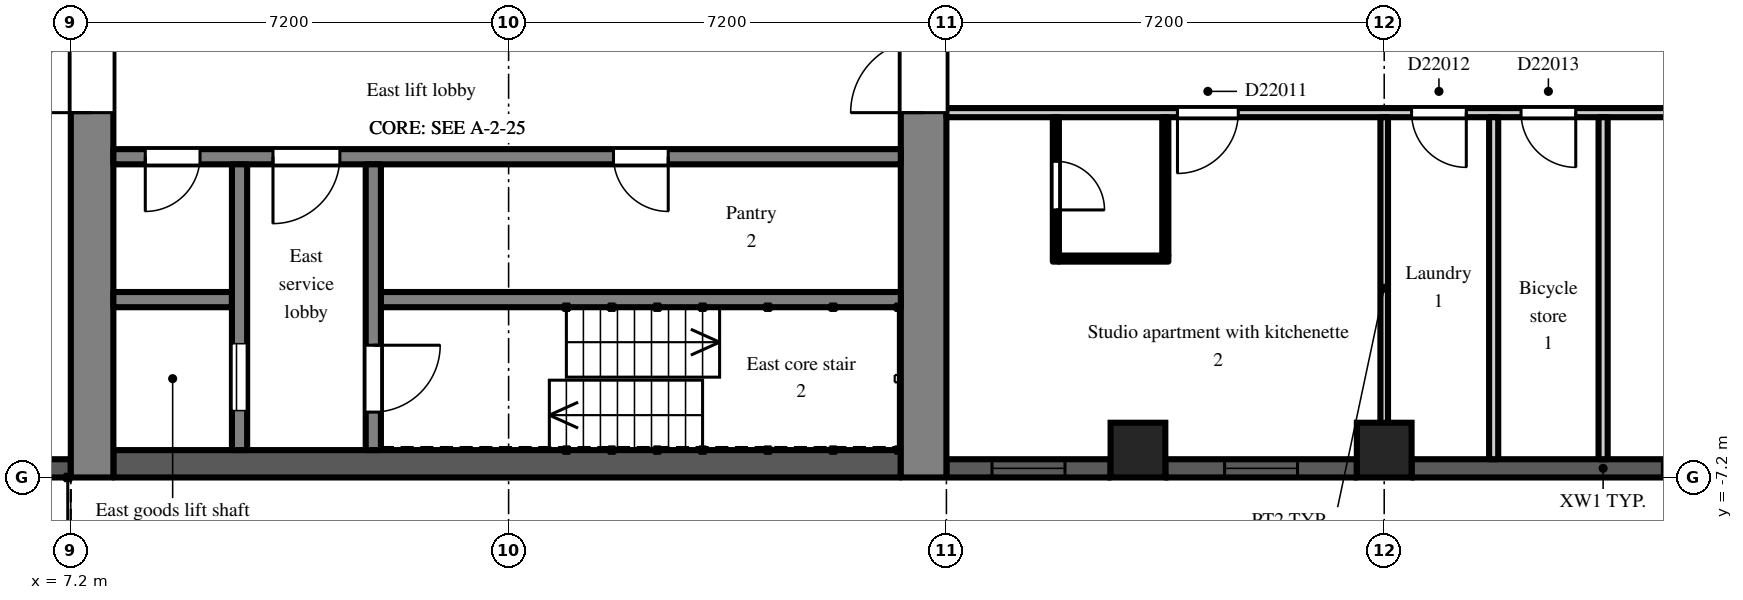
"""IFC4 building model, lengths in metres.
Left out: names, types, materials, properties, quantities, classifications, styles, units other than length and angle.
Written with IfcOpenShell. Run it as: python <this file> out.ifc"""

import sys

from ifc_helpers import new_model, si_unit, direction, frame, frame_2d, origin, origin_2d, place, context, subcontext, project, spatial, rectangle, extrude, element, fill, save


model = new_model("IFC4")
c1 = context("Model", 3, precision=1e-05, world=origin(), true_north=direction((0.0, 1.0)))
c2 = subcontext(c1, "Body", "Model", "MODEL_VIEW")
j1 = project(units=[si_unit("LENGTHUNIT", "METRE"), si_unit("PLANEANGLEUNIT", "RADIAN")], contexts=[c1])
p1 = place(None, origin())
s1 = spatial("IfcSite", under=j1, at=p1, CompositionType="ELEMENT")
p2 = place(p1, origin())
s2 = spatial("IfcBuilding", under=s1, at=p2, CompositionType="ELEMENT")
p3 = place(p2, frame((0.0, 0.0, 156.3)))
s3 = spatial("IfcBuildingStorey", under=s2, at=p3, CompositionType="ELEMENT", Elevation=156.3)
for number, where, z_axis, x_axis in (
    (1, (24.75, -6.75, 0.0), (0.0, 0.0, 1.0), (1.0, 0.0, 0.0)),
    (2, (28.8, -6.75, 0.0), (0.0, 0.0, 1.0), (1.0, 0.0, 0.0)),
):
    element("IfcColumn", number, at=place(p3, frame(where, z_axis=z_axis, x_axis=x_axis)), inside=s3, PredefinedType="COLUMN", context=c2, shape_type="SweptSolid", body=[
        extrude(rectangle(XDim=0.9, YDim=0.9, at=origin_2d()), origin(), (0.0, 0.0, 1.0), 3.0),
    ])
p4 = place(p3, frame((21.6, -7.05, 0.0), z_axis=(0.0, 0.0, 1.0), x_axis=(1.0, 0.0, 0.0)))
e3 = element("IfcWall", 3, at=p4, inside=s3, PredefinedType="SOLIDWALL", context=c2, shape_type="SweptSolid", body=[
    extrude(rectangle(XDim=2.7, YDim=0.3, at=frame_2d((1.35, 0.0))), origin(), (0.0, 0.0, 1.0), 2.2),
])
p5 = place(p4, frame((0.75, 0.0, 0.2)))
e4 = element("IfcOpeningElement", 4, at=p5, cuts=e3, PredefinedType="OPENING", context=c2, shape_type="SweptSolid", body=[
    extrude(rectangle(XDim=1.2, YDim=1.85, at=frame_2d((0.6, 0.925))), frame((0.0, 0.16, 0.0), z_axis=(0.0, -1.0, 0.0), x_axis=(1.0, 0.0, 0.0)), (0.0, 0.0, 1.0), 0.32),
])
p6 = place(p3, frame((25.2, -7.05, 0.0), z_axis=(0.0, 0.0, 1.0), x_axis=(1.0, 0.0, 0.0)))
e5 = element("IfcWall", 5, at=p6, inside=s3, PredefinedType="SOLIDWALL", context=c2, shape_type="SweptSolid", body=[
    extrude(rectangle(XDim=3.15, YDim=0.3, at=frame_2d((1.575, 0.0))), origin(), (0.0, 0.0, 1.0), 2.2),
])
p7 = place(p6, frame((0.975, 0.0, 0.2)))
e6 = element("IfcOpeningElement", 6, at=p7, cuts=e5, PredefinedType="OPENING", context=c2, shape_type="SweptSolid", body=[
    extrude(rectangle(XDim=1.2, YDim=1.85, at=frame_2d((0.6, 0.925))), frame((0.0, 0.16, 0.0), z_axis=(0.0, -1.0, 0.0), x_axis=(1.0, 0.0, 0.0)), (0.0, 0.0, 1.0), 0.32),
])
p8 = place(p3, frame((29.25, -7.05, 0.0), z_axis=(0.0, 0.0, 1.0), x_axis=(1.0, 0.0, 0.0)))
e7 = element("IfcWall", 7, at=p8, inside=s3, PredefinedType="SOLIDWALL", context=c2, shape_type="SweptSolid", body=[
    extrude(rectangle(XDim=6.3, YDim=0.3, at=frame_2d((3.15, 0.0))), origin(), (0.0, 0.0, 1.0), 2.2),
])
p9 = place(p8, frame((4.125, 0.0, 0.2)))
e8 = element("IfcOpeningElement", 8, at=p9, cuts=e7, PredefinedType="OPENING", context=c2, shape_type="SweptSolid", body=[
    extrude(rectangle(XDim=1.2, YDim=1.85, at=frame_2d((0.6, 0.925))), frame((0.0, 0.16, 0.0), z_axis=(0.0, -1.0, 0.0), x_axis=(1.0, 0.0, 0.0)), (0.0, 0.0, 1.0), 0.32),
])
p10 = place(p3, frame((4.2, -7.05, 0.0), z_axis=(0.0, 0.0, 1.0), x_axis=(1.0, 0.0, 0.0)))
e9 = element("IfcWall", 9, at=p10, inside=s3, PredefinedType="SOLIDWALL", context=c2, shape_type="SweptSolid", body=[
    extrude(rectangle(XDim=3.0, YDim=0.3, at=frame_2d((1.5, 0.0))), origin(), (0.0, 0.0, 1.0), 2.2),
])
p11 = place(p3, frame((7.55, -7.2, 0.0), z_axis=(0.0, 0.0, 1.0), x_axis=(0.0, 1.0, 0.0)))
e10 = element("IfcWall", 10, at=p11, inside=s3, PredefinedType="SHEAR", context=c2, shape_type="SweptSolid", body=[
    extrude(rectangle(XDim=14.4, YDim=0.7, at=frame_2d((7.2, 0.0))), origin(), (0.0, 0.0, 1.0), 2.6),
])
p12 = place(p11, frame((6.0, 0.0, 0.0)))
e11 = element("IfcOpeningElement", 11, at=p12, cuts=e10, PredefinedType="OPENING", context=c2, shape_type="SweptSolid", body=[
    extrude(rectangle(XDim=2.4, YDim=2.2, at=frame_2d((1.2, 1.1))), frame((0.0, 0.36, 0.0), z_axis=(0.0, -1.0, 0.0), x_axis=(1.0, 0.0, 0.0)), (0.0, 0.0, 1.0), 0.72),
])
p13 = place(p3, frame((21.225, -7.2, 0.0), z_axis=(0.0, 0.0, 1.0), x_axis=(0.0, 1.0, 0.0)))
e12 = element("IfcWall", 12, at=p13, inside=s3, PredefinedType="SHEAR", context=c2, shape_type="SweptSolid", body=[
    extrude(rectangle(XDim=14.4, YDim=0.75, at=frame_2d((7.2, 0.0))), origin(), (0.0, 0.0, 1.0), 2.6),
])
p14 = place(p13, frame((6.0, 0.0, 0.0)))
e13 = element("IfcOpeningElement", 13, at=p14, cuts=e12, PredefinedType="OPENING", context=c2, shape_type="SweptSolid", body=[
    extrude(rectangle(XDim=2.4, YDim=2.2, at=frame_2d((1.2, 1.1))), frame((0.0, 0.385, 0.0), z_axis=(0.0, -1.0, 0.0), x_axis=(1.0, 0.0, 0.0)), (0.0, 0.0, 1.0), 0.77),
])
p15 = place(p3, frame((7.9, -6.975, 0.0), z_axis=(0.0, 0.0, 1.0), x_axis=(1.0, 0.0, 0.0)))
e14 = element("IfcWall", 14, at=p15, inside=s3, PredefinedType="SHEAR", context=c2, shape_type="SweptSolid", body=[
    extrude(rectangle(XDim=12.95, YDim=0.45, at=frame_2d((6.475, 0.0))), origin(), (0.0, 0.0, 1.0), 2.6),
])
p16 = place(p3, frame((7.9, -1.925, 0.0), z_axis=(0.0, 0.0, 1.0), x_axis=(1.0, 0.0, 0.0)))
e15 = element("IfcWall", 15, at=p16, inside=s3, PredefinedType="SHEAR", context=c2, shape_type="SweptSolid", body=[
    extrude(rectangle(XDim=12.95, YDim=0.25, at=frame_2d((6.475, 0.0))), origin(), (0.0, 0.0, 1.0), 2.6),
])
p17 = place(p16, frame((0.525, 0.0, 0.0)))
e16 = element("IfcOpeningElement", 16, at=p17, cuts=e15, PredefinedType="OPENING", context=c2, shape_type="SweptSolid", body=[
    extrude(rectangle(XDim=0.9, YDim=2.1, at=frame_2d((0.45, 1.05))), frame((0.0, 0.135, 0.0), z_axis=(0.0, -1.0, 0.0), x_axis=(1.0, 0.0, 0.0)), (0.0, 0.0, 1.0), 0.27),
])
p18 = place(p16, frame((2.625, 0.0, 0.0)))
e17 = element("IfcOpeningElement", 17, at=p18, cuts=e15, PredefinedType="OPENING", context=c2, shape_type="SweptSolid", body=[
    extrude(rectangle(XDim=1.1, YDim=2.1, at=frame_2d((0.55, 1.05))), frame((0.0, 0.135, 0.0), z_axis=(0.0, -1.0, 0.0), x_axis=(1.0, 0.0, 0.0)), (0.0, 0.0, 1.0), 0.27),
])
p19 = place(p16, frame((8.225, 0.0, 0.0)))
e18 = element("IfcOpeningElement", 18, at=p19, cuts=e15, PredefinedType="OPENING", context=c2, shape_type="SweptSolid", body=[
    extrude(rectangle(XDim=0.9, YDim=2.1, at=frame_2d((0.45, 1.05))), frame((0.0, 0.135, 0.0), z_axis=(0.0, -1.0, 0.0), x_axis=(1.0, 0.0, 0.0)), (0.0, 0.0, 1.0), 0.27),
])
p20 = place(p3, frame((7.9, -4.275, 0.0), z_axis=(0.0, 0.0, 1.0), x_axis=(1.0, 0.0, 0.0)))
e19 = element("IfcWall", 19, at=p20, inside=s3, PredefinedType="SHEAR", context=c2, shape_type="SweptSolid", body=[
    extrude(rectangle(XDim=1.95, YDim=0.25, at=frame_2d((0.975, 0.0))), origin(), (0.0, 0.0, 1.0), 2.6),
])
p21 = place(p3, frame((12.3, -4.275, 0.0), z_axis=(0.0, 0.0, 1.0), x_axis=(1.0, 0.0, 0.0)))
e20 = element("IfcWall", 20, at=p21, inside=s3, PredefinedType="SHEAR", context=c2, shape_type="SweptSolid", body=[
    extrude(rectangle(XDim=8.55, YDim=0.25, at=frame_2d((4.275, 0.0))), origin(), (0.0, 0.0, 1.0), 2.6),
])
p22 = place(p3, frame((9.975, -2.05, 0.0), z_axis=(0.0, 0.0, 1.0), x_axis=(0.0, -1.0, 0.0)))
e21 = element("IfcWall", 21, at=p22, inside=s3, PredefinedType="SHEAR", context=c2, shape_type="SweptSolid", body=[
    extrude(rectangle(XDim=4.7, YDim=0.25, at=frame_2d((2.35, 0.0))), origin(), (0.0, 0.0, 1.0), 2.6),
])
p23 = place(p22, frame((2.95, 0.0, 0.0)))
e22 = element("IfcOpeningElement", 22, at=p23, cuts=e21, PredefinedType="OPENING", context=c2, shape_type="SweptSolid", body=[
    extrude(rectangle(XDim=1.1, YDim=2.1, at=frame_2d((0.55, 1.05))), frame((0.0, 0.135, 0.0), z_axis=(0.0, -1.0, 0.0), x_axis=(1.0, 0.0, 0.0)), (0.0, 0.0, 1.0), 0.27),
])
p24 = place(p3, frame((12.175, -2.05, 0.0), z_axis=(0.0, 0.0, 1.0), x_axis=(0.0, -1.0, 0.0)))
e23 = element("IfcWall", 23, at=p24, inside=s3, PredefinedType="SHEAR", context=c2, shape_type="SweptSolid", body=[
    extrude(rectangle(XDim=4.7, YDim=0.25, at=frame_2d((2.35, 0.0))), origin(), (0.0, 0.0, 1.0), 2.6),
])
p25 = place(p24, frame((2.975, 0.0, 0.0)))
e24 = element("IfcOpeningElement", 24, at=p25, cuts=e23, PredefinedType="OPENING", context=c2, shape_type="SweptSolid", body=[
    extrude(rectangle(XDim=1.1, YDim=2.1, at=frame_2d((0.55, 1.05))), frame((0.0, 0.135, 0.0), z_axis=(0.0, -1.0, 0.0), x_axis=(1.0, 0.0, 0.0)), (0.0, 0.0, 1.0), 0.27),
])
p26 = place(p3, frame((21.6, -1.2, 0.0), z_axis=(0.0, 0.0, 1.0), x_axis=(1.0, 0.0, 0.0)))
e25 = element("IfcWall", 25, at=p26, inside=s3, PredefinedType="PARTITIONING", context=c2, shape_type="SweptSolid", body=[
    extrude(rectangle(XDim=14.9, YDim=0.15, at=frame_2d((7.45, 0.0))), origin(), (0.0, 0.0, 1.0), 2.6),
])
p27 = place(p26, frame((3.8, 0.0, 0.0)))
e26 = element("IfcOpeningElement", 26, at=p27, cuts=e25, PredefinedType="OPENING", context=c2, shape_type="SweptSolid", body=[
    extrude(rectangle(XDim=1.0, YDim=2.1, at=frame_2d((0.5, 1.05))), frame((0.0, 0.085, 0.0), z_axis=(0.0, -1.0, 0.0), x_axis=(1.0, 0.0, 0.0)), (0.0, 0.0, 1.0), 0.17),
])
p28 = place(p26, frame((7.65, 0.0, 0.0)))
e27 = element("IfcOpeningElement", 27, at=p28, cuts=e25, PredefinedType="OPENING", context=c2, shape_type="SweptSolid", body=[
    extrude(rectangle(XDim=0.9, YDim=2.1, at=frame_2d((0.45, 1.05))), frame((0.0, 0.085, 0.0), z_axis=(0.0, -1.0, 0.0), x_axis=(1.0, 0.0, 0.0)), (0.0, 0.0, 1.0), 0.17),
])
p29 = place(p26, frame((9.45, 0.0, 0.0)))
e28 = element("IfcOpeningElement", 28, at=p29, cuts=e25, PredefinedType="OPENING", context=c2, shape_type="SweptSolid", body=[
    extrude(rectangle(XDim=0.9, YDim=2.1, at=frame_2d((0.45, 1.05))), frame((0.0, 0.085, 0.0), z_axis=(0.0, -1.0, 0.0), x_axis=(1.0, 0.0, 0.0)), (0.0, 0.0, 1.0), 0.17),
])
p30 = place(p26, frame((11.95, 0.0, 0.0)))
e29 = element("IfcOpeningElement", 29, at=p30, cuts=e25, PredefinedType="OPENING", context=c2, shape_type="SweptSolid", body=[
    extrude(rectangle(XDim=1.8, YDim=2.1, at=frame_2d((0.9, 1.05))), frame((0.0, 0.085, 0.0), z_axis=(0.0, -1.0, 0.0), x_axis=(1.0, 0.0, 0.0)), (0.0, 0.0, 1.0), 0.17),
])
p31 = place(p3, frame((23.4, -3.65, 0.0), z_axis=(0.0, 0.0, 1.0), x_axis=(0.0, 1.0, 0.0)))
e30 = element("IfcWall", 30, at=p31, inside=s3, PredefinedType="PARTITIONING", context=c2, shape_type="SweptSolid", body=[
    extrude(rectangle(XDim=2.375, YDim=0.1, at=frame_2d((1.188, 0.0))), origin(), (0.0, 0.0, 1.0), 2.6),
])
p32 = place(p31, frame((0.85, 0.0, 0.0)))
e31 = element("IfcOpeningElement", 31, at=p32, cuts=e30, PredefinedType="OPENING", context=c2, shape_type="SweptSolid", body=[
    extrude(rectangle(XDim=0.8, YDim=2.1, at=frame_2d((0.4, 1.05))), frame((0.0, 0.06, 0.0), z_axis=(0.0, -1.0, 0.0), x_axis=(1.0, 0.0, 0.0)), (0.0, 0.0, 1.0), 0.12),
])
p33 = place(p3, frame((23.45, -3.6, 0.0), z_axis=(0.0, 0.0, 1.0), x_axis=(1.0, 0.0, 0.0)))
e32 = element("IfcWall", 32, at=p33, inside=s3, PredefinedType="PARTITIONING", context=c2, shape_type="SweptSolid", body=[
    extrude(rectangle(XDim=1.8, YDim=0.1, at=frame_2d((0.9, 0.0))), origin(), (0.0, 0.0, 1.0), 2.6),
])
p34 = place(p3, frame((25.2, -3.55, 0.0), z_axis=(0.0, 0.0, 1.0), x_axis=(0.0, 1.0, 0.0)))
e33 = element("IfcWall", 33, at=p34, inside=s3, PredefinedType="PARTITIONING", context=c2, shape_type="SweptSolid", body=[
    extrude(rectangle(XDim=2.275, YDim=0.1, at=frame_2d((1.138, 0.0))), origin(), (0.0, 0.0, 1.0), 2.6),
])
p35 = place(p3, frame((28.8, -6.9, 0.0), z_axis=(0.0, 0.0, 1.0), x_axis=(0.0, 1.0, 0.0)))
e34 = element("IfcWall", 34, at=p35, inside=s3, PredefinedType="PARTITIONING", context=c2, shape_type="SweptSolid", body=[
    extrude(rectangle(XDim=5.625, YDim=0.125, at=frame_2d((2.812, 0.0))), origin(), (0.0, 0.0, 1.0), 2.6),
])
for number, where, z_axis, x_axis in (
    (35, (30.6, -6.9, 0.0), (0.0, 0.0, 1.0), (0.0, 1.0, 0.0)),
    (36, (32.4, -6.9, 0.0), (0.0, 0.0, 1.0), (0.0, 1.0, 0.0)),
):
    element("IfcWall", number, at=place(p3, frame(where, z_axis=z_axis, x_axis=x_axis)), inside=s3, PredefinedType="PARTITIONING", context=c2, shape_type="SweptSolid", body=[
        extrude(rectangle(XDim=5.625, YDim=0.15, at=frame_2d((2.812, 0.0))), origin(), (0.0, 0.0, 1.0), 2.6),
    ])
p36 = place(p5, origin())
e37 = element("IfcWindow", 37, at=p36, inside=s3, PartitioningType="SINGLE_PANEL", PredefinedType="WINDOW", context=c2, shape_type="SweptSolid", body=[
    extrude(rectangle(XDim=1.2, YDim=1.85, at=frame_2d((0.6, 0.925))), frame((0.0, 0.03, 0.0), z_axis=(0.0, -1.0, 0.0), x_axis=(1.0, 0.0, 0.0)), (0.0, 0.0, 1.0), 0.06),
])
fill(e4, e37)
p37 = place(p7, origin())
e38 = element("IfcWindow", 38, at=p37, inside=s3, PartitioningType="SINGLE_PANEL", PredefinedType="WINDOW", context=c2, shape_type="SweptSolid", body=[
    extrude(rectangle(XDim=1.2, YDim=1.85, at=frame_2d((0.6, 0.925))), frame((0.0, 0.03, 0.0), z_axis=(0.0, -1.0, 0.0), x_axis=(1.0, 0.0, 0.0)), (0.0, 0.0, 1.0), 0.06),
])
fill(e6, e38)
p38 = place(p9, origin())
e39 = element("IfcWindow", 39, at=p38, inside=s3, PartitioningType="SINGLE_PANEL", PredefinedType="WINDOW", context=c2, shape_type="SweptSolid", body=[
    extrude(rectangle(XDim=1.2, YDim=1.85, at=frame_2d((0.6, 0.925))), frame((0.0, 0.03, 0.0), z_axis=(0.0, -1.0, 0.0), x_axis=(1.0, 0.0, 0.0)), (0.0, 0.0, 1.0), 0.06),
])
fill(e8, e39)
p39 = place(p23, origin())
e40 = element("IfcDoor", 40, at=p39, inside=s3, OperationType="SLIDING_TO_LEFT", PredefinedType="DOOR", context=c2, shape_type="SweptSolid", body=[
    extrude(rectangle(XDim=1.1, YDim=2.1, at=frame_2d((0.55, 1.05))), frame((0.0, 0.025, 0.0), z_axis=(0.0, -1.0, 0.0), x_axis=(1.0, 0.0, 0.0)), (0.0, 0.0, 1.0), 0.05),
])
fill(e22, e40)
p40 = place(p25, origin())
e41 = element("IfcDoor", 41, at=p40, inside=s3, OperationType="SINGLE_SWING_LEFT", PredefinedType="DOOR", context=c2, shape_type="SweptSolid", body=[
    extrude(rectangle(XDim=1.1, YDim=2.1, at=frame_2d((0.55, 1.05))), frame((0.0, 0.025, 0.0), z_axis=(0.0, -1.0, 0.0), x_axis=(1.0, 0.0, 0.0)), (0.0, 0.0, 1.0), 0.05),
])
fill(e24, e41)
p41 = place(p17, frame((0.9, 0.0, 0.0), z_axis=(0.0, 0.0, 1.0), x_axis=(-1.0, 0.0, 0.0)))
e42 = element("IfcDoor", 42, at=p41, inside=s3, OperationType="SINGLE_SWING_RIGHT", PredefinedType="DOOR", context=c2, shape_type="SweptSolid", body=[
    extrude(rectangle(XDim=0.9, YDim=2.1, at=frame_2d((0.45, 1.05))), frame((0.0, 0.025, 0.0), z_axis=(0.0, -1.0, 0.0), x_axis=(1.0, 0.0, 0.0)), (0.0, 0.0, 1.0), 0.05),
])
fill(e16, e42)
p42 = place(p18, frame((1.1, 0.0, 0.0), z_axis=(0.0, 0.0, 1.0), x_axis=(-1.0, 0.0, 0.0)))
e43 = element("IfcDoor", 43, at=p42, inside=s3, OperationType="SINGLE_SWING_RIGHT", PredefinedType="DOOR", context=c2, shape_type="SweptSolid", body=[
    extrude(rectangle(XDim=1.1, YDim=2.1, at=frame_2d((0.55, 1.05))), frame((0.0, 0.025, 0.0), z_axis=(0.0, -1.0, 0.0), x_axis=(1.0, 0.0, 0.0)), (0.0, 0.0, 1.0), 0.05),
])
fill(e17, e43)
p43 = place(p12, origin())
e44 = element("IfcDoor", 44, at=p43, inside=s3, OperationType="DOUBLE_DOOR_DOUBLE_SWING", PredefinedType="DOOR", context=c2, shape_type="SweptSolid", body=[
    extrude(rectangle(XDim=2.4, YDim=2.2, at=frame_2d((1.2, 1.1))), frame((0.0, 0.025, 0.0), z_axis=(0.0, -1.0, 0.0), x_axis=(1.0, 0.0, 0.0)), (0.0, 0.0, 1.0), 0.05),
])
fill(e11, e44)
p44 = place(p14, origin())
e45 = element("IfcDoor", 45, at=p44, inside=s3, OperationType="DOUBLE_DOOR_DOUBLE_SWING", PredefinedType="DOOR", context=c2, shape_type="SweptSolid", body=[
    extrude(rectangle(XDim=2.4, YDim=2.2, at=frame_2d((1.2, 1.1))), frame((0.0, 0.025, 0.0), z_axis=(0.0, -1.0, 0.0), x_axis=(1.0, 0.0, 0.0)), (0.0, 0.0, 1.0), 0.05),
])
fill(e13, e45)
p45 = place(p19, frame((0.9, 0.0, 0.0), z_axis=(0.0, 0.0, 1.0), x_axis=(-1.0, 0.0, 0.0)))
e46 = element("IfcDoor", 46, at=p45, inside=s3, OperationType="SINGLE_SWING_LEFT", PredefinedType="DOOR", context=c2, shape_type="SweptSolid", body=[
    extrude(rectangle(XDim=0.9, YDim=2.1, at=frame_2d((0.45, 1.05))), frame((0.0, 0.025, 0.0), z_axis=(0.0, -1.0, 0.0), x_axis=(1.0, 0.0, 0.0)), (0.0, 0.0, 1.0), 0.05),
])
fill(e18, e46)
p46 = place(p32, frame((0.8, 0.0, 0.0), z_axis=(0.0, 0.0, 1.0), x_axis=(-1.0, 0.0, 0.0)))
e47 = element("IfcDoor", 47, at=p46, inside=s3, OperationType="SINGLE_SWING_RIGHT", PredefinedType="DOOR", context=c2, shape_type="SweptSolid", body=[
    extrude(rectangle(XDim=0.8, YDim=2.1, at=frame_2d((0.4, 1.05))), frame((0.0, 0.025, 0.0), z_axis=(0.0, -1.0, 0.0), x_axis=(1.0, 0.0, 0.0)), (0.0, 0.0, 1.0), 0.05),
])
fill(e31, e47)
p47 = place(p27, frame((1.0, 0.0, 0.0), z_axis=(0.0, 0.0, 1.0), x_axis=(-1.0, 0.0, 0.0)))
e48 = element("IfcDoor", 48, at=p47, inside=s3, OperationType="SINGLE_SWING_RIGHT", PredefinedType="DOOR", context=c2, shape_type="SweptSolid", body=[
    extrude(rectangle(XDim=1.0, YDim=2.1, at=frame_2d((0.5, 1.05))), frame((0.0, 0.025, 0.0), z_axis=(0.0, -1.0, 0.0), x_axis=(1.0, 0.0, 0.0)), (0.0, 0.0, 1.0), 0.05),
])
fill(e26, e48)
p48 = place(p28, frame((0.9, 0.0, 0.0), z_axis=(0.0, 0.0, 1.0), x_axis=(-1.0, 0.0, 0.0)))
e49 = element("IfcDoor", 49, at=p48, inside=s3, OperationType="SINGLE_SWING_LEFT", PredefinedType="DOOR", context=c2, shape_type="SweptSolid", body=[
    extrude(rectangle(XDim=0.9, YDim=2.1, at=frame_2d((0.45, 1.05))), frame((0.0, 0.025, 0.0), z_axis=(0.0, -1.0, 0.0), x_axis=(1.0, 0.0, 0.0)), (0.0, 0.0, 1.0), 0.05),
])
fill(e27, e49)
p49 = place(p29, frame((0.9, 0.0, 0.0), z_axis=(0.0, 0.0, 1.0), x_axis=(-1.0, 0.0, 0.0)))
e50 = element("IfcDoor", 50, at=p49, inside=s3, OperationType="SINGLE_SWING_LEFT", PredefinedType="DOOR", context=c2, shape_type="SweptSolid", body=[
    extrude(rectangle(XDim=0.9, YDim=2.1, at=frame_2d((0.45, 1.05))), frame((0.0, 0.025, 0.0), z_axis=(0.0, -1.0, 0.0), x_axis=(1.0, 0.0, 0.0)), (0.0, 0.0, 1.0), 0.05),
])
fill(e28, e50)
save(model, sys.argv[1])
